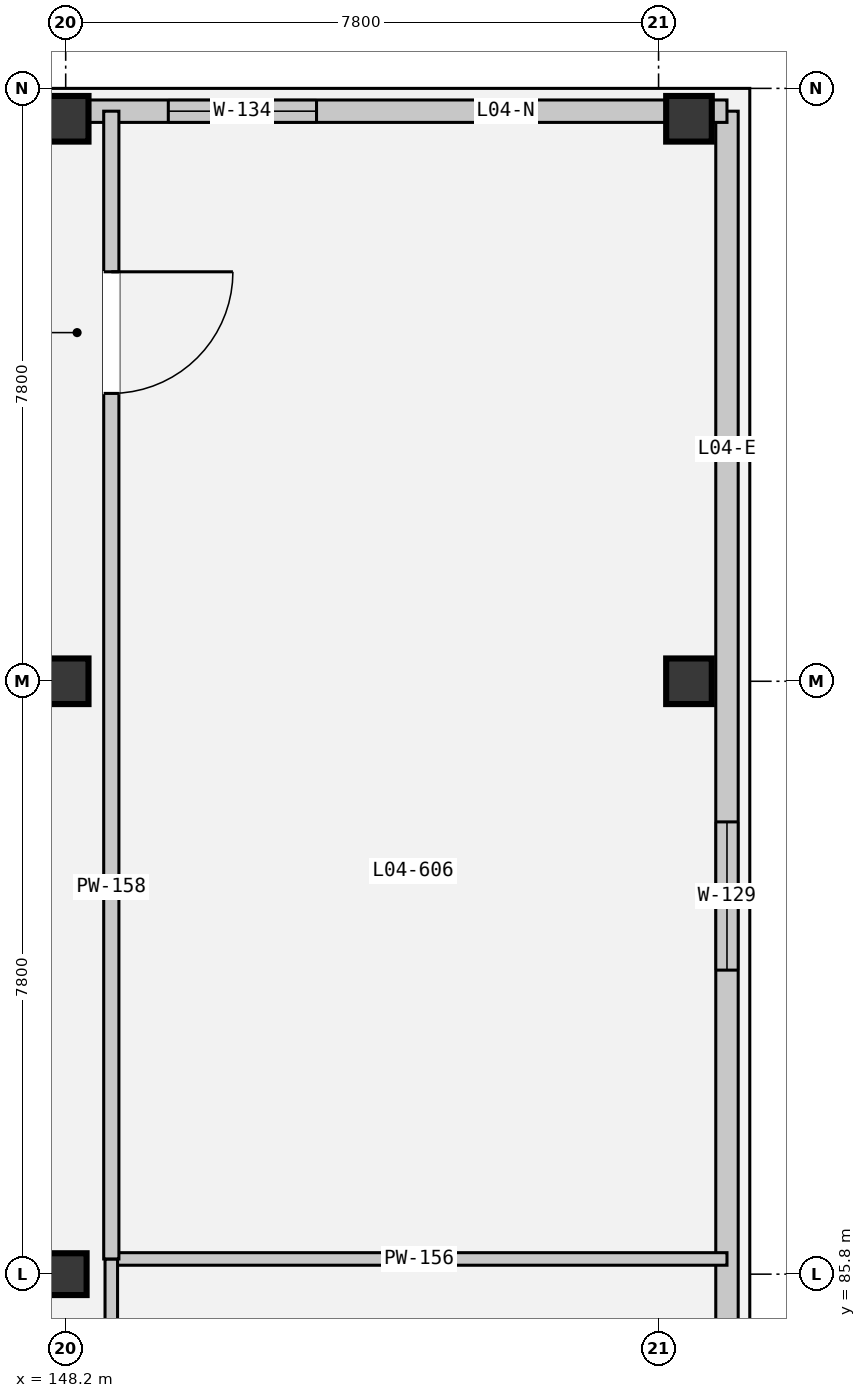
"""IFC4 building model, lengths in metres.
Left out: names, types, materials, properties, quantities, classifications, styles, units other than length and angle.
Written with IfcOpenShell. Run it as: python <this file> out.ifc"""

import sys

from ifc_helpers import new_model, si_unit, direction, frame, frame_2d, origin, origin_2d, place, context, subcontext, project, spatial, rectangle, extrude, element, fill, save


model = new_model("IFC4")
c1 = context("Model", 3, precision=1e-05, world=origin(), true_north=direction((0.0, 1.0)))
c2 = subcontext(c1, "Body", "Model", "MODEL_VIEW")
j1 = project(units=[si_unit("LENGTHUNIT", "METRE"), si_unit("PLANEANGLEUNIT", "RADIAN")], contexts=[c1])
p1 = place(None, origin())
s1 = spatial("IfcSite", under=j1, at=p1, CompositionType="ELEMENT")
p2 = place(p1, origin())
s2 = spatial("IfcBuilding", under=s1, at=p2, CompositionType="ELEMENT")
p3 = place(p2, frame((0.0, 0.0, 19.8)))
s3 = spatial("IfcBuildingStorey", under=s2, at=p3, CompositionType="ELEMENT", Elevation=19.8)
p4 = place(p3, frame((148.2, 85.8, 0.0), z_axis=(0.0, 0.0, 1.0), x_axis=(1.0, 0.0, 0.0)))
e1 = element("IfcColumn", 1, at=p4, inside=s3, PredefinedType="COLUMN", context=c2, shape_type="SweptSolid", body=[
    extrude(rectangle(XDim=0.55, YDim=0.55, at=origin_2d()), origin(), (0.0, 0.0, 1.0), 4.5),
])
for number, where, z_axis, x_axis in (
    (2, (148.2, 93.6, 0.0), (0.0, 0.0, 1.0), (1.0, 0.0, 0.0)),
    (3, (148.2, 101.0, 0.0), (0.0, 0.0, 1.0), (1.0, 0.0, 0.0)),
    (4, (156.4, 93.6, 0.0), (0.0, 0.0, 1.0), (1.0, 0.0, 0.0)),
    (5, (156.4, 101.0, 0.0), (0.0, 0.0, 1.0), (1.0, 0.0, 0.0)),
):
    element("IfcColumn", number, at=place(p3, frame(where, z_axis=z_axis, x_axis=x_axis)), inside=s3, PredefinedType="COLUMN", context=c2, shape_type="SweptSolid", body=[
        extrude(rectangle(XDim=0.6, YDim=0.6, at=origin_2d()), origin(), (0.0, 0.0, 1.0), 4.5),
    ])
p5 = place(p3, frame((156.9, 65.3, 0.0), z_axis=(0.0, 0.0, 1.0), x_axis=(0.0, 1.0, 0.0)))
e6 = element("IfcWall", 6, at=p5, inside=s3, PredefinedType="SOLIDWALL", context=c2, shape_type="SweptSolid", body=[
    extrude(rectangle(XDim=35.8, YDim=0.295, at=frame_2d((17.9, 0.0))), origin(), (0.0, 0.0, 1.0), 3.57),
])
p6 = place(p5, frame((1.1, 0.0, 0.78)))
e7 = element("IfcOpeningElement", 7, at=p6, cuts=e6, PredefinedType="OPENING", context=c2, shape_type="SweptSolid", body=[
    extrude(rectangle(XDim=1.95, YDim=1.8, at=frame_2d((0.975, 0.9))), frame((0.0, 0.157, 0.0), z_axis=(0.0, -1.0, 0.0), x_axis=(1.0, 0.0, 0.0)), (0.0, 0.0, 1.0), 0.315),
])
p7 = place(p5, frame((5.0, 0.0, 0.78)))
e8 = element("IfcOpeningElement", 8, at=p7, cuts=e6, PredefinedType="OPENING", context=c2, shape_type="SweptSolid", body=[
    extrude(rectangle(XDim=1.95, YDim=1.8, at=frame_2d((0.975, 0.9))), frame((0.0, 0.157, 0.0), z_axis=(0.0, -1.0, 0.0), x_axis=(1.0, 0.0, 0.0)), (0.0, 0.0, 1.0), 0.315),
])
p8 = place(p5, frame((8.9, 0.0, 0.78)))
e9 = element("IfcOpeningElement", 9, at=p8, cuts=e6, PredefinedType="OPENING", context=c2, shape_type="SweptSolid", body=[
    extrude(rectangle(XDim=1.95, YDim=1.8, at=frame_2d((0.975, 0.9))), frame((0.0, 0.157, 0.0), z_axis=(0.0, -1.0, 0.0), x_axis=(1.0, 0.0, 0.0)), (0.0, 0.0, 1.0), 0.315),
])
p9 = place(p5, frame((12.8, 0.0, 0.78)))
e10 = element("IfcOpeningElement", 10, at=p9, cuts=e6, PredefinedType="OPENING", context=c2, shape_type="SweptSolid", body=[
    extrude(rectangle(XDim=1.95, YDim=1.8, at=frame_2d((0.975, 0.9))), frame((0.0, 0.157, 0.0), z_axis=(0.0, -1.0, 0.0), x_axis=(1.0, 0.0, 0.0)), (0.0, 0.0, 1.0), 0.315),
])
p10 = place(p5, frame((16.7, 0.0, 0.78)))
e11 = element("IfcOpeningElement", 11, at=p10, cuts=e6, PredefinedType="OPENING", context=c2, shape_type="SweptSolid", body=[
    extrude(rectangle(XDim=1.95, YDim=1.8, at=frame_2d((0.975, 0.9))), frame((0.0, 0.157, 0.0), z_axis=(0.0, -1.0, 0.0), x_axis=(1.0, 0.0, 0.0)), (0.0, 0.0, 1.0), 0.315),
])
p11 = place(p5, frame((24.5, 0.0, 0.78)))
e12 = element("IfcOpeningElement", 12, at=p11, cuts=e6, PredefinedType="OPENING", context=c2, shape_type="SweptSolid", body=[
    extrude(rectangle(XDim=1.95, YDim=1.8, at=frame_2d((0.975, 0.9))), frame((0.0, 0.157, 0.0), z_axis=(0.0, -1.0, 0.0), x_axis=(1.0, 0.0, 0.0)), (0.0, 0.0, 1.0), 0.315),
])
p12 = place(p3, frame((132.85, 101.1, 0.0), z_axis=(0.0, 0.0, 1.0), x_axis=(1.0, 0.0, 0.0)))
e13 = element("IfcWall", 13, at=p12, inside=s3, PredefinedType="SOLIDWALL", context=c2, shape_type="SweptSolid", body=[
    extrude(rectangle(XDim=24.05, YDim=0.295, at=frame_2d((12.025, 0.0))), origin(), (0.0, 0.0, 1.0), 3.57),
])
p13 = place(p12, frame((1.1, 0.0, 0.78)))
e14 = element("IfcOpeningElement", 14, at=p13, cuts=e13, PredefinedType="OPENING", context=c2, shape_type="SweptSolid", body=[
    extrude(rectangle(XDim=1.95, YDim=1.8, at=frame_2d((0.975, 0.9))), frame((0.0, 0.157, 0.0), z_axis=(0.0, -1.0, 0.0), x_axis=(1.0, 0.0, 0.0)), (0.0, 0.0, 1.0), 0.315),
])
p14 = place(p12, frame((5.0, 0.0, 0.78)))
e15 = element("IfcOpeningElement", 15, at=p14, cuts=e13, PredefinedType="OPENING", context=c2, shape_type="SweptSolid", body=[
    extrude(rectangle(XDim=1.95, YDim=1.8, at=frame_2d((0.975, 0.9))), frame((0.0, 0.157, 0.0), z_axis=(0.0, -1.0, 0.0), x_axis=(1.0, 0.0, 0.0)), (0.0, 0.0, 1.0), 0.315),
])
p15 = place(p12, frame((8.9, 0.0, 0.78)))
e16 = element("IfcOpeningElement", 16, at=p15, cuts=e13, PredefinedType="OPENING", context=c2, shape_type="SweptSolid", body=[
    extrude(rectangle(XDim=1.95, YDim=1.8, at=frame_2d((0.975, 0.9))), frame((0.0, 0.157, 0.0), z_axis=(0.0, -1.0, 0.0), x_axis=(1.0, 0.0, 0.0)), (0.0, 0.0, 1.0), 0.315),
])
p16 = place(p12, frame((12.8, 0.0, 0.78)))
e17 = element("IfcOpeningElement", 17, at=p16, cuts=e13, PredefinedType="OPENING", context=c2, shape_type="SweptSolid", body=[
    extrude(rectangle(XDim=1.95, YDim=1.8, at=frame_2d((0.975, 0.9))), frame((0.0, 0.157, 0.0), z_axis=(0.0, -1.0, 0.0), x_axis=(1.0, 0.0, 0.0)), (0.0, 0.0, 1.0), 0.315),
])
p17 = place(p12, frame((16.7, 0.0, 0.78)))
e18 = element("IfcOpeningElement", 18, at=p17, cuts=e13, PredefinedType="OPENING", context=c2, shape_type="SweptSolid", body=[
    extrude(rectangle(XDim=1.95, YDim=1.8, at=frame_2d((0.975, 0.9))), frame((0.0, 0.157, 0.0), z_axis=(0.0, -1.0, 0.0), x_axis=(1.0, 0.0, 0.0)), (0.0, 0.0, 1.0), 0.315),
])
p18 = place(p3, frame((156.9, 86.0, 0.0), z_axis=(0.0, 0.0, 1.0), x_axis=(-1.0, 0.0, 0.0)))
e19 = element("IfcWall", 19, at=p18, inside=s3, PredefinedType="PARTITIONING", context=c2, shape_type="SweptSolid", body=[
    extrude(rectangle(XDim=8.1, YDim=0.165, at=frame_2d((4.05, 0.0))), origin(), (0.0, 0.0, 1.0), 3.45),
])
p19 = place(p3, frame((148.8, 86.0, 0.0), z_axis=(0.0, 0.0, 1.0), x_axis=(0.0, -1.0, 0.0)))
e20 = element("IfcWall", 20, at=p19, inside=s3, PredefinedType="PARTITIONING", context=c2, shape_type="SweptSolid", body=[
    extrude(rectangle(XDim=20.7, YDim=0.165, at=frame_2d((10.35, 0.0))), origin(), (0.0, 0.0, 1.0), 3.45),
])
p20 = place(p19, frame((2.305, 0.0, 0.0)))
e21 = element("IfcOpeningElement", 21, at=p20, cuts=e20, PredefinedType="OPENING", context=c2, shape_type="SweptSolid", body=[
    extrude(rectangle(XDim=1.45, YDim=2.2, at=frame_2d((0.725, 1.1))), frame((0.0, 0.093, 0.0), z_axis=(0.0, -1.0, 0.0), x_axis=(1.0, 0.0, 0.0)), (0.0, 0.0, 1.0), 0.185),
])
p21 = place(p3, frame((148.8, 101.1, 0.0), z_axis=(0.0, 0.0, 1.0), x_axis=(0.0, -1.0, 0.0)))
e22 = element("IfcWall", 22, at=p21, inside=s3, PredefinedType="PARTITIONING", context=c2, shape_type="SweptSolid", body=[
    extrude(rectangle(XDim=15.1, YDim=0.2, at=frame_2d((7.55, 0.0))), origin(), (0.0, 0.0, 1.0), 3.45),
])
p22 = place(p21, frame((2.113, 0.0, 0.0)))
e23 = element("IfcOpeningElement", 23, at=p22, cuts=e22, PredefinedType="OPENING", context=c2, shape_type="SweptSolid", body=[
    extrude(rectangle(XDim=1.6, YDim=2.25, at=frame_2d((0.8, 1.125))), frame((0.0, 0.11, 0.0), z_axis=(0.0, -1.0, 0.0), x_axis=(1.0, 0.0, 0.0)), (0.0, 0.0, 1.0), 0.22),
])
p23 = place(p11, origin())
e24 = element("IfcWindow", 24, at=p23, inside=s3, PartitioningType="SINGLE_PANEL", PredefinedType="WINDOW", context=c2, shape_type="SweptSolid", body=[
    extrude(rectangle(XDim=1.95, YDim=1.8, at=frame_2d((0.975, 0.9))), frame((0.0, 0.03, 0.0), z_axis=(0.0, -1.0, 0.0), x_axis=(1.0, 0.0, 0.0)), (0.0, 0.0, 1.0), 0.06),
])
fill(e12, e24)
p24 = place(p17, origin())
e25 = element("IfcWindow", 25, at=p24, inside=s3, PartitioningType="SINGLE_PANEL", PredefinedType="WINDOW", context=c2, shape_type="SweptSolid", body=[
    extrude(rectangle(XDim=1.95, YDim=1.8, at=frame_2d((0.975, 0.9))), frame((0.0, 0.03, 0.0), z_axis=(0.0, -1.0, 0.0), x_axis=(1.0, 0.0, 0.0)), (0.0, 0.0, 1.0), 0.06),
])
fill(e18, e25)
p25 = place(p22, origin())
e26 = element("IfcDoor", 26, at=p25, inside=s3, OperationType="DOUBLE_DOOR_SINGLE_SWING", PredefinedType="DOOR", context=c2, shape_type="SweptSolid", body=[
    extrude(rectangle(XDim=1.6, YDim=2.25, at=frame_2d((0.8, 1.125))), frame((0.0, 0.025, 0.0), z_axis=(0.0, -1.0, 0.0), x_axis=(1.0, 0.0, 0.0)), (0.0, 0.0, 1.0), 0.05),
])
fill(e23, e26)
save(model, sys.argv[1])
